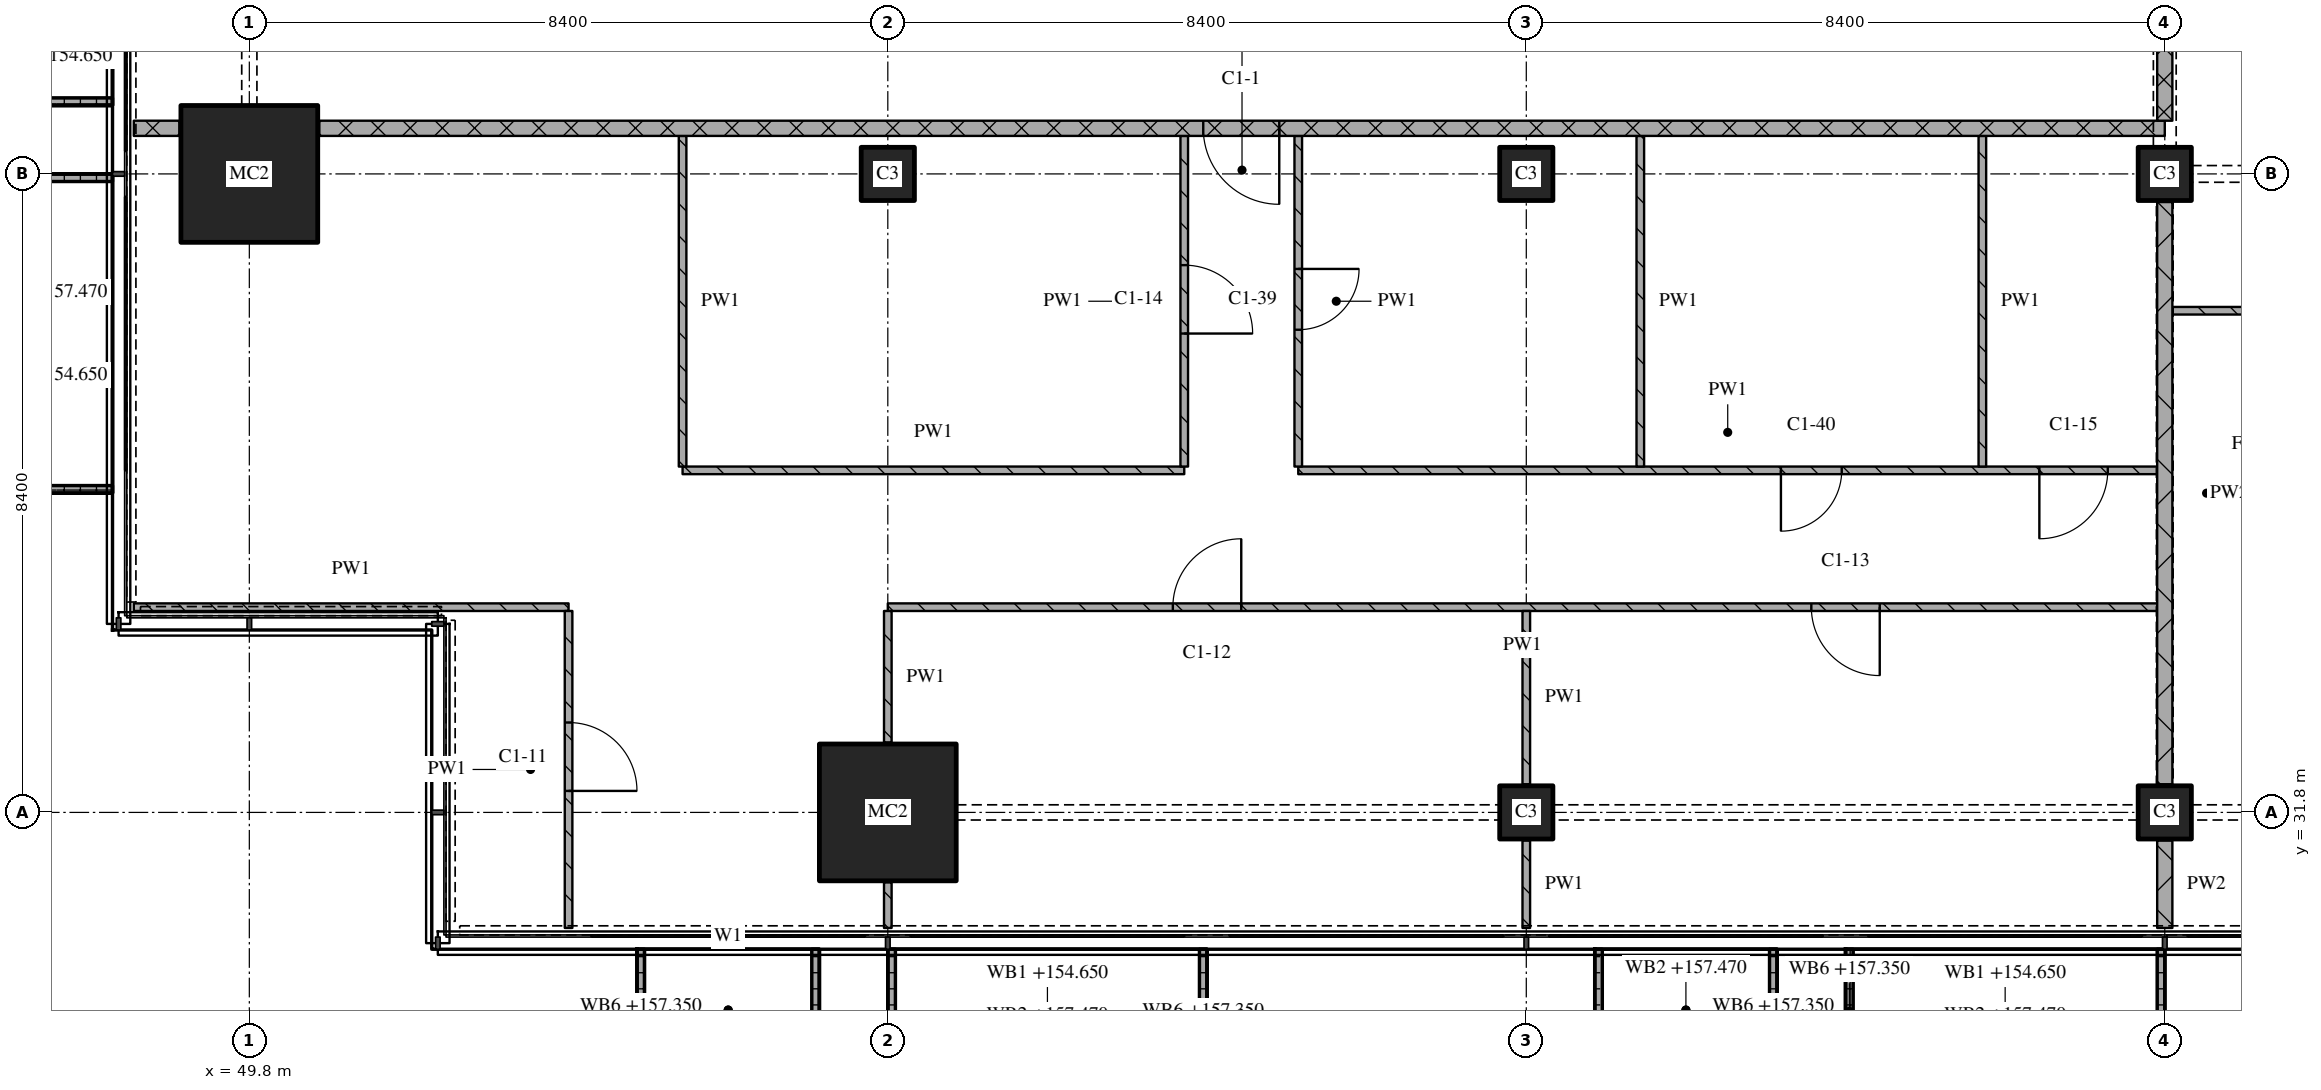
"""IFC4 building model, lengths in metres.
Left out: names, types, materials, properties, quantities, classifications, styles, units other than length and angle.
Written with IfcOpenShell. Run it as: python <this file> out.ifc"""

import sys

from ifc_helpers import new_model, si_unit, direction, frame, frame_2d, origin, origin_2d, place, context, subcontext, project, spatial, polyline, rectangle, outline, extrude, element, fill, save


model = new_model("IFC4")
c1 = context("Model", 3, precision=1e-05, world=origin(), true_north=direction((0.0, 1.0)))
c2 = subcontext(c1, "Body", "Model", "MODEL_VIEW")
j1 = project(units=[si_unit("LENGTHUNIT", "METRE"), si_unit("PLANEANGLEUNIT", "RADIAN")], contexts=[c1])
p1 = place(None, origin())
s1 = spatial("IfcSite", under=j1, at=p1, CompositionType="ELEMENT")
p2 = place(p1, origin())
s2 = spatial("IfcBuilding", under=s1, at=p2, CompositionType="ELEMENT")
p3 = place(p2, frame((0.0, 0.0, 154.65)))
s3 = spatial("IfcBuildingStorey", under=s2, at=p3, CompositionType="ELEMENT", Elevation=154.65)
for number, where, z_axis, x_axis in (
    (1, (49.8, 40.2, 0.0), (0.0, 0.0, 1.0), (1.0, 0.0, 0.0)),
    (2, (58.2, 31.8, 0.0), (0.0, 0.0, 1.0), (1.0, 0.0, 0.0)),
):
    element("IfcColumn", number, at=place(p3, frame(where, z_axis=z_axis, x_axis=x_axis)), inside=s3, PredefinedType="COLUMN", context=c2, shape_type="SweptSolid", body=[
        extrude(rectangle(XDim=1.8, YDim=1.8, at=origin_2d()), origin(), (0.0, 0.0, 1.0), 3.6),
    ])
for number, where, z_axis, x_axis in (
    (3, (58.2, 40.2, 0.0), (0.0, 0.0, 1.0), (1.0, 0.0, 0.0)),
    (4, (66.6, 31.8, 0.0), (0.0, 0.0, 1.0), (1.0, 0.0, 0.0)),
    (5, (66.6, 40.2, 0.0), (0.0, 0.0, 1.0), (1.0, 0.0, 0.0)),
    (6, (75.0, 31.8, 0.0), (0.0, 0.0, 1.0), (1.0, 0.0, 0.0)),
    (7, (75.0, 40.2, 0.0), (0.0, 0.0, 1.0), (1.0, 0.0, 0.0)),
):
    element("IfcColumn", number, at=place(p3, frame(where, z_axis=z_axis, x_axis=x_axis)), inside=s3, PredefinedType="COLUMN", context=c2, shape_type="SweptSolid", body=[
        extrude(rectangle(XDim=0.7, YDim=0.7, at=origin_2d()), origin(), (0.0, 0.0, 1.0), 3.6),
    ])
p4 = place(p3, origin())
e8 = element("IfcWall", 8, at=p4, inside=s3, PredefinedType="SOLIDWALL", context=c2, shape_type="SweptSolid", body=[
    extrude(outline(polyline([(54.9, 30.0), (55.0, 30.0), (55.0, 28.5), (57.2, 28.5), (57.2, 30.0), (57.3, 30.0), (57.3, 28.4), (54.9, 28.4), (54.9, 30.0)])), origin(), (0.0, 0.0, 1.0), 1.0),
])
p5 = place(p3, origin())
e9 = element("IfcWall", 9, at=p5, inside=s3, PredefinedType="SOLIDWALL", context=c2, shape_type="SweptSolid", body=[
    extrude(outline(polyline([(58.2, 30.0), (58.3, 30.0), (58.3, 28.367), (62.3, 28.367), (62.3, 30.0), (62.4, 30.0), (62.4, 28.267), (58.2, 28.267), (58.2, 30.0)])), origin(), (0.0, 0.0, 1.0), 1.0),
])
p6 = place(p3, origin())
e10 = element("IfcWall", 10, at=p6, inside=s3, PredefinedType="SOLIDWALL", context=c2, shape_type="SweptSolid", body=[
    extrude(outline(polyline([(67.5, 30.0), (67.6, 30.0), (67.6, 28.5), (69.8, 28.5), (69.8, 30.0), (69.9, 30.0), (69.9, 28.4), (67.5, 28.4), (67.5, 30.0)])), origin(), (0.0, 0.0, 1.0), 1.0),
])
p7 = place(p3, origin())
e11 = element("IfcWall", 11, at=p7, inside=s3, PredefinedType="SOLIDWALL", context=c2, shape_type="SweptSolid", body=[
    extrude(outline(polyline([(70.8, 30.0), (70.9, 30.0), (70.9, 28.367), (74.9, 28.367), (74.9, 30.0), (75.0, 30.0), (75.0, 28.267), (70.8, 28.267), (70.8, 30.0)])), origin(), (0.0, 0.0, 1.0), 1.0),
])
p8 = place(p3, origin())
e12 = element("IfcWall", 12, at=p8, inside=s3, PredefinedType="SOLIDWALL", context=c2, shape_type="SweptSolid", body=[
    extrude(outline(polyline([(48.0, 43.5), (48.0, 43.4), (46.5, 43.4), (46.5, 41.2), (48.0, 41.2), (48.0, 41.1), (46.4, 41.1), (46.4, 43.5), (48.0, 43.5)])), origin(), (0.0, 0.0, 1.0), 1.0),
])
p9 = place(p3, origin())
e13 = element("IfcWall", 13, at=p9, inside=s3, PredefinedType="SOLIDWALL", context=c2, shape_type="SweptSolid", body=[
    extrude(outline(polyline([(48.0, 40.2), (48.0, 40.1), (46.367, 40.1), (46.367, 36.1), (48.0, 36.1), (48.0, 36.0), (46.267, 36.0), (46.267, 40.2), (48.0, 40.2)])), origin(), (0.0, 0.0, 1.0), 1.0),
])
p10 = place(p3, frame((48.28, 34.5, 0.0), z_axis=(0.0, 0.0, 1.0), x_axis=(1.0, 0.0, 0.0)))
e14 = element("IfcWall", 14, at=p10, inside=s3, PredefinedType="PARTITIONING", context=c2, shape_type="SweptSolid", body=[
    extrude(rectangle(XDim=5.72, YDim=0.1, at=frame_2d((2.86, 0.0))), origin(), (0.0, 0.0, 1.0), 3.32),
])
p11 = place(p3, frame((74.9, 34.5, 0.0), z_axis=(0.0, 0.0, 1.0), x_axis=(-1.0, 0.0, 0.0)))
e15 = element("IfcWall", 15, at=p11, inside=s3, PredefinedType="PARTITIONING", context=c2, shape_type="SweptSolid", body=[
    extrude(rectangle(XDim=16.7, YDim=0.1, at=frame_2d((8.35, 0.0))), origin(), (0.0, 0.0, 1.0), 3.32),
])
p12 = place(p11, frame((3.65, 0.0, 0.0)))
e16 = element("IfcOpeningElement", 16, at=p12, cuts=e15, PredefinedType="OPENING", context=c2, shape_type="SweptSolid", body=[
    extrude(rectangle(XDim=0.9, YDim=2.1, at=frame_2d((0.45, 1.05))), frame((0.0, 0.06, 0.0), z_axis=(0.0, -1.0, 0.0), x_axis=(1.0, 0.0, 0.0)), (0.0, 0.0, 1.0), 0.12),
])
p13 = place(p11, frame((12.05, 0.0, 0.0)))
e17 = element("IfcOpeningElement", 17, at=p13, cuts=e15, PredefinedType="OPENING", context=c2, shape_type="SweptSolid", body=[
    extrude(rectangle(XDim=0.9, YDim=2.1, at=frame_2d((0.45, 1.05))), frame((0.0, 0.06, 0.0), z_axis=(0.0, -1.0, 0.0), x_axis=(1.0, 0.0, 0.0)), (0.0, 0.0, 1.0), 0.12),
])
p14 = place(p3, frame((55.5, 36.3, 0.0), z_axis=(0.0, 0.0, 1.0), x_axis=(1.0, 0.0, 0.0)))
e18 = element("IfcWall", 18, at=p14, inside=s3, PredefinedType="PARTITIONING", context=c2, shape_type="SweptSolid", body=[
    extrude(rectangle(XDim=6.6, YDim=0.1, at=frame_2d((3.3, 0.0))), origin(), (0.0, 0.0, 1.0), 3.32),
])
p15 = place(p3, frame((63.6, 36.3, 0.0), z_axis=(0.0, 0.0, 1.0), x_axis=(1.0, 0.0, 0.0)))
e19 = element("IfcWall", 19, at=p15, inside=s3, PredefinedType="PARTITIONING", context=c2, shape_type="SweptSolid", body=[
    extrude(rectangle(XDim=11.3, YDim=0.1, at=frame_2d((5.65, 0.0))), origin(), (0.0, 0.0, 1.0), 3.32),
])
p16 = place(p15, frame((6.35, 0.0, 0.0)))
e20 = element("IfcOpeningElement", 20, at=p16, cuts=e19, PredefinedType="OPENING", context=c2, shape_type="SweptSolid", body=[
    extrude(rectangle(XDim=0.8, YDim=2.1, at=frame_2d((0.4, 1.05))), frame((0.0, 0.06, 0.0), z_axis=(0.0, -1.0, 0.0), x_axis=(1.0, 0.0, 0.0)), (0.0, 0.0, 1.0), 0.12),
])
p17 = place(p15, frame((9.75, 0.0, 0.0)))
e21 = element("IfcOpeningElement", 21, at=p17, cuts=e19, PredefinedType="OPENING", context=c2, shape_type="SweptSolid", body=[
    extrude(rectangle(XDim=0.9, YDim=2.1, at=frame_2d((0.45, 1.05))), frame((0.0, 0.06, 0.0), z_axis=(0.0, -1.0, 0.0), x_axis=(1.0, 0.0, 0.0)), (0.0, 0.0, 1.0), 0.12),
])
p18 = place(p3, frame((75.1, 38.4, 0.0), z_axis=(0.0, 0.0, 1.0), x_axis=(1.0, 0.0, 0.0)))
e22 = element("IfcWall", 22, at=p18, inside=s3, PredefinedType="PARTITIONING", context=c2, shape_type="SweptSolid", body=[
    extrude(rectangle(XDim=2.9, YDim=0.1, at=frame_2d((1.45, 0.0))), origin(), (0.0, 0.0, 1.0), 3.32),
])
p19 = place(p18, frame((1.0, 0.0, 0.0)))
e23 = element("IfcOpeningElement", 23, at=p19, cuts=e22, PredefinedType="OPENING", context=c2, shape_type="SweptSolid", body=[
    extrude(rectangle(XDim=0.8, YDim=2.1, at=frame_2d((0.4, 1.05))), frame((0.0, 0.06, 0.0), z_axis=(0.0, -1.0, 0.0), x_axis=(1.0, 0.0, 0.0)), (0.0, 0.0, 1.0), 0.12),
])
p20 = place(p3, frame((48.28, 40.8, 0.0), z_axis=(0.0, 0.0, 1.0), x_axis=(1.0, 0.0, 0.0)))
e24 = element("IfcWall", 24, at=p20, inside=s3, PredefinedType="PARTITIONING", context=c2, shape_type="SweptSolid", body=[
    extrude(rectangle(XDim=0.6, YDim=0.2, at=frame_2d((0.3, 0.0))), origin(), (0.0, 0.0, 1.0), 3.32),
])
p21 = place(p3, frame((75.0, 40.8, 0.0), z_axis=(0.0, 0.0, 1.0), x_axis=(-1.0, 0.0, 0.0)))
e25 = element("IfcWall", 25, at=p21, inside=s3, PredefinedType="PARTITIONING", context=c2, shape_type="SweptSolid", body=[
    extrude(rectangle(XDim=24.28, YDim=0.2, at=frame_2d((12.14, 0.0))), origin(), (0.0, 0.0, 1.0), 3.32),
])
p22 = place(p21, frame((11.65, 0.0, 0.0)))
e26 = element("IfcOpeningElement", 26, at=p22, cuts=e25, PredefinedType="OPENING", context=c2, shape_type="SweptSolid", body=[
    extrude(rectangle(XDim=1.0, YDim=2.1, at=frame_2d((0.5, 1.05))), frame((0.0, 0.11, 0.0), z_axis=(0.0, -1.0, 0.0), x_axis=(1.0, 0.0, 0.0)), (0.0, 0.0, 1.0), 0.22),
])
p23 = place(p3, frame((54.0, 30.28, 0.0), z_axis=(0.0, 0.0, 1.0), x_axis=(0.0, 1.0, 0.0)))
e27 = element("IfcWall", 27, at=p23, inside=s3, PredefinedType="PARTITIONING", context=c2, shape_type="SweptSolid", body=[
    extrude(rectangle(XDim=4.17, YDim=0.1, at=frame_2d((2.085, 0.0))), origin(), (0.0, 0.0, 1.0), 3.32),
])
p24 = place(p23, frame((1.803, 0.0, 0.0)))
e28 = element("IfcOpeningElement", 28, at=p24, cuts=e27, PredefinedType="OPENING", context=c2, shape_type="SweptSolid", body=[
    extrude(rectangle(XDim=0.9, YDim=2.1, at=frame_2d((0.45, 1.05))), frame((0.0, 0.06, 0.0), z_axis=(0.0, -1.0, 0.0), x_axis=(1.0, 0.0, 0.0)), (0.0, 0.0, 1.0), 0.12),
])
p25 = place(p3, frame((55.5, 40.7, 0.0), z_axis=(0.0, 0.0, 1.0), x_axis=(0.0, -1.0, 0.0)))
e29 = element("IfcWall", 29, at=p25, inside=s3, PredefinedType="PARTITIONING", context=c2, shape_type="SweptSolid", body=[
    extrude(rectangle(XDim=4.35, YDim=0.1, at=frame_2d((2.175, 0.0))), origin(), (0.0, 0.0, 1.0), 3.32),
])
p26 = place(p3, frame((58.2, 30.88, 0.0), z_axis=(0.0, 0.0, 1.0), x_axis=(0.0, -1.0, 0.0)))
e30 = element("IfcWall", 30, at=p26, inside=s3, PredefinedType="PARTITIONING", context=c2, shape_type="SweptSolid", body=[
    extrude(rectangle(XDim=0.6, YDim=0.1, at=frame_2d((0.3, 0.0))), origin(), (0.0, 0.0, 1.0), 3.32),
])
p27 = place(p3, frame((58.2, 34.45, 0.0), z_axis=(0.0, 0.0, 1.0), x_axis=(0.0, -1.0, 0.0)))
e31 = element("IfcWall", 31, at=p27, inside=s3, PredefinedType="PARTITIONING", context=c2, shape_type="SweptSolid", body=[
    extrude(rectangle(XDim=1.73, YDim=0.1, at=frame_2d((0.865, 0.0))), origin(), (0.0, 0.0, 1.0), 3.32),
])
p28 = place(p3, frame((62.1, 36.35, 0.0), z_axis=(0.0, 0.0, 1.0), x_axis=(0.0, 1.0, 0.0)))
e32 = element("IfcWall", 32, at=p28, inside=s3, PredefinedType="PARTITIONING", context=c2, shape_type="SweptSolid", body=[
    extrude(rectangle(XDim=4.35, YDim=0.1, at=frame_2d((2.175, 0.0))), origin(), (0.0, 0.0, 1.0), 3.32),
])
p29 = place(p28, frame((1.75, 0.0, 0.0)))
e33 = element("IfcOpeningElement", 33, at=p29, cuts=e32, PredefinedType="OPENING", context=c2, shape_type="SweptSolid", body=[
    extrude(rectangle(XDim=0.9, YDim=2.1, at=frame_2d((0.45, 1.05))), frame((0.0, 0.06, 0.0), z_axis=(0.0, -1.0, 0.0), x_axis=(1.0, 0.0, 0.0)), (0.0, 0.0, 1.0), 0.12),
])
p30 = place(p3, frame((63.6, 40.7, 0.0), z_axis=(0.0, 0.0, 1.0), x_axis=(0.0, -1.0, 0.0)))
e34 = element("IfcWall", 34, at=p30, inside=s3, PredefinedType="PARTITIONING", context=c2, shape_type="SweptSolid", body=[
    extrude(rectangle(XDim=4.35, YDim=0.1, at=frame_2d((2.175, 0.0))), origin(), (0.0, 0.0, 1.0), 3.32),
])
p31 = place(p30, frame((1.75, 0.0, 0.0)))
e35 = element("IfcOpeningElement", 35, at=p31, cuts=e34, PredefinedType="OPENING", context=c2, shape_type="SweptSolid", body=[
    extrude(rectangle(XDim=0.8, YDim=2.1, at=frame_2d((0.4, 1.05))), frame((0.0, 0.06, 0.0), z_axis=(0.0, -1.0, 0.0), x_axis=(1.0, 0.0, 0.0)), (0.0, 0.0, 1.0), 0.12),
])
p32 = place(p3, frame((66.6, 31.43, 0.0), z_axis=(0.0, 0.0, 1.0), x_axis=(0.0, -1.0, 0.0)))
e36 = element("IfcWall", 36, at=p32, inside=s3, PredefinedType="PARTITIONING", context=c2, shape_type="SweptSolid", body=[
    extrude(rectangle(XDim=1.15, YDim=0.1, at=frame_2d((0.575, 0.0))), origin(), (0.0, 0.0, 1.0), 3.32),
])
p33 = place(p3, frame((66.6, 34.45, 0.0), z_axis=(0.0, 0.0, 1.0), x_axis=(0.0, -1.0, 0.0)))
e37 = element("IfcWall", 37, at=p33, inside=s3, PredefinedType="PARTITIONING", context=c2, shape_type="SweptSolid", body=[
    extrude(rectangle(XDim=2.28, YDim=0.1, at=frame_2d((1.14, 0.0))), origin(), (0.0, 0.0, 1.0), 3.32),
])
for number, where, z_axis, x_axis in (
    (38, (68.1, 40.7, 0.0), (0.0, 0.0, 1.0), (0.0, -1.0, 0.0)),
    (39, (72.6, 40.7, 0.0), (0.0, 0.0, 1.0), (0.0, -1.0, 0.0)),
):
    element("IfcWall", number, at=place(p3, frame(where, z_axis=z_axis, x_axis=x_axis)), inside=s3, PredefinedType="PARTITIONING", context=c2, shape_type="SweptSolid", body=[
        extrude(rectangle(XDim=4.35, YDim=0.1, at=frame_2d((2.175, 0.0))), origin(), (0.0, 0.0, 1.0), 3.32),
    ])
p34 = place(p3, frame((75.0, 43.1, 0.0), z_axis=(0.0, 0.0, 1.0), x_axis=(0.0, -1.0, 0.0)))
e40 = element("IfcWall", 40, at=p34, inside=s3, PredefinedType="PARTITIONING", context=c2, shape_type="SweptSolid", body=[
    extrude(rectangle(XDim=2.2, YDim=0.2, at=frame_2d((1.1, 0.0))), origin(), (0.0, 0.0, 1.0), 2.43),
])
p35 = place(p3, frame((75.0, 31.43, 0.0), z_axis=(0.0, 0.0, 1.0), x_axis=(0.0, -1.0, 0.0)))
e41 = element("IfcWall", 41, at=p35, inside=s3, PredefinedType="PARTITIONING", context=c2, shape_type="SweptSolid", body=[
    extrude(rectangle(XDim=1.15, YDim=0.2, at=frame_2d((0.575, 0.0))), origin(), (0.0, 0.0, 1.0), 3.32),
])
p36 = place(p3, frame((75.0, 39.83, 0.0), z_axis=(0.0, 0.0, 1.0), x_axis=(0.0, -1.0, 0.0)))
e42 = element("IfcWall", 42, at=p36, inside=s3, PredefinedType="PARTITIONING", context=c2, shape_type="SweptSolid", body=[
    extrude(rectangle(XDim=7.66, YDim=0.2, at=frame_2d((3.83, 0.0))), origin(), (0.0, 0.0, 1.0), 2.72),
])
p37 = place(p12, origin())
e43 = element("IfcDoor", 43, at=p37, inside=s3, OperationType="SINGLE_SWING_LEFT", PredefinedType="DOOR", context=c2, shape_type="SweptSolid", body=[
    extrude(rectangle(XDim=0.9, YDim=2.1, at=frame_2d((0.45, 1.05))), frame((0.0, 0.025, 0.0), z_axis=(0.0, -1.0, 0.0), x_axis=(1.0, 0.0, 0.0)), (0.0, 0.0, 1.0), 0.05),
])
fill(e16, e43)
p38 = place(p13, origin())
e44 = element("IfcDoor", 44, at=p38, inside=s3, OperationType="SINGLE_SWING_RIGHT", PredefinedType="DOOR", context=c2, shape_type="SweptSolid", body=[
    extrude(rectangle(XDim=0.9, YDim=2.1, at=frame_2d((0.45, 1.05))), frame((0.0, 0.025, 0.0), z_axis=(0.0, -1.0, 0.0), x_axis=(1.0, 0.0, 0.0)), (0.0, 0.0, 1.0), 0.05),
])
fill(e17, e44)
p39 = place(p16, origin())
e45 = element("IfcDoor", 45, at=p39, inside=s3, OperationType="SINGLE_SWING_RIGHT", PredefinedType="DOOR", context=c2, shape_type="SweptSolid", body=[
    extrude(rectangle(XDim=0.8, YDim=2.1, at=frame_2d((0.4, 1.05))), frame((0.0, 0.025, 0.0), z_axis=(0.0, -1.0, 0.0), x_axis=(1.0, 0.0, 0.0)), (0.0, 0.0, 1.0), 0.05),
])
fill(e20, e45)
p40 = place(p17, origin())
e46 = element("IfcDoor", 46, at=p40, inside=s3, OperationType="SINGLE_SWING_RIGHT", PredefinedType="DOOR", context=c2, shape_type="SweptSolid", body=[
    extrude(rectangle(XDim=0.9, YDim=2.1, at=frame_2d((0.45, 1.05))), frame((0.0, 0.025, 0.0), z_axis=(0.0, -1.0, 0.0), x_axis=(1.0, 0.0, 0.0)), (0.0, 0.0, 1.0), 0.05),
])
fill(e21, e46)
p41 = place(p22, origin())
e47 = element("IfcDoor", 47, at=p41, inside=s3, OperationType="SINGLE_SWING_LEFT", PredefinedType="DOOR", context=c2, shape_type="SweptSolid", body=[
    extrude(rectangle(XDim=1.0, YDim=2.1, at=frame_2d((0.5, 1.05))), frame((0.0, 0.025, 0.0), z_axis=(0.0, -1.0, 0.0), x_axis=(1.0, 0.0, 0.0)), (0.0, 0.0, 1.0), 0.05),
])
fill(e26, e47)
p42 = place(p24, origin())
e48 = element("IfcDoor", 48, at=p42, inside=s3, OperationType="SINGLE_SWING_RIGHT", PredefinedType="DOOR", context=c2, shape_type="SweptSolid", body=[
    extrude(rectangle(XDim=0.9, YDim=2.1, at=frame_2d((0.45, 1.05))), frame((0.0, 0.025, 0.0), z_axis=(0.0, -1.0, 0.0), x_axis=(1.0, 0.0, 0.0)), (0.0, 0.0, 1.0), 0.05),
])
fill(e28, e48)
p43 = place(p29, origin())
e49 = element("IfcDoor", 49, at=p43, inside=s3, OperationType="SINGLE_SWING_RIGHT", PredefinedType="DOOR", context=c2, shape_type="SweptSolid", body=[
    extrude(rectangle(XDim=0.9, YDim=2.1, at=frame_2d((0.45, 1.05))), frame((0.0, 0.025, 0.0), z_axis=(0.0, -1.0, 0.0), x_axis=(1.0, 0.0, 0.0)), (0.0, 0.0, 1.0), 0.05),
])
fill(e33, e49)
p44 = place(p31, origin())
e50 = element("IfcDoor", 50, at=p44, inside=s3, OperationType="SINGLE_SWING_LEFT", PredefinedType="DOOR", context=c2, shape_type="SweptSolid", body=[
    extrude(rectangle(XDim=0.8, YDim=2.1, at=frame_2d((0.4, 1.05))), frame((0.0, 0.025, 0.0), z_axis=(0.0, -1.0, 0.0), x_axis=(1.0, 0.0, 0.0)), (0.0, 0.0, 1.0), 0.05),
])
fill(e35, e50)
save(model, sys.argv[1])
